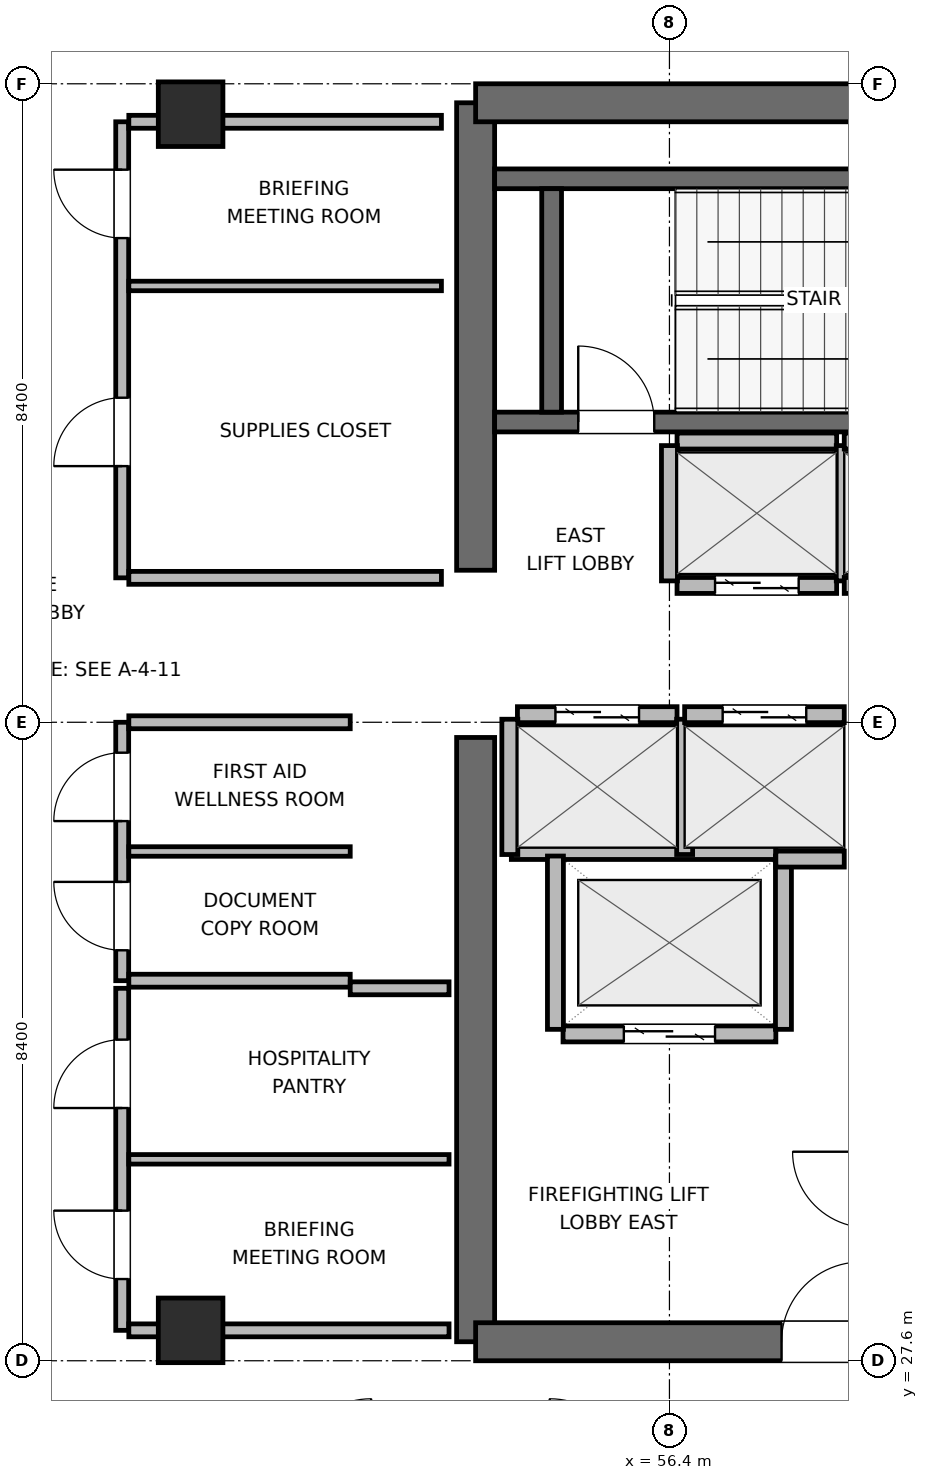
"""IFC4 building model, lengths in metres.
Left out: names, types, materials, properties, quantities, classifications, styles, units other than length and angle.
Written with IfcOpenShell. Run it as: python <this file> out.ifc"""

import sys

from ifc_helpers import new_model, si_unit, direction, frame, frame_2d, origin, origin_2d, place, context, subcontext, project, spatial, rectangle, extrude, element, fill, save


model = new_model("IFC4")
c1 = context("Model", 3, precision=1e-05, world=origin(), true_north=direction((0.0, 1.0)))
c2 = subcontext(c1, "Body", "Model", "MODEL_VIEW")
j1 = project(units=[si_unit("LENGTHUNIT", "METRE"), si_unit("PLANEANGLEUNIT", "RADIAN")], contexts=[c1])
p1 = place(None, origin())
s1 = spatial("IfcSite", under=j1, at=p1, CompositionType="ELEMENT")
p2 = place(p1, origin())
s2 = spatial("IfcBuilding", under=s1, at=p2, CompositionType="ELEMENT")
p3 = place(p2, frame((0.0, 0.0, 346.5)))
s3 = spatial("IfcBuildingStorey", under=s2, at=p3, CompositionType="ELEMENT", Elevation=346.5)
p4 = place(p3, frame((53.85, 27.85, 0.0), z_axis=(0.0, 0.0, 1.0), x_axis=(0.0, 1.0, 0.0)))
e1 = element("IfcWall", 1, at=p4, inside=s3, PredefinedType="SHEAR", context=c2, shape_type="SweptSolid", body=[
    extrude(rectangle(XDim=7.95, YDim=0.5, at=frame_2d((3.975, 0.0))), origin(), (0.0, 0.0, 1.0), 3.9),
])
p5 = place(p3, frame((53.85, 38.0, 0.0), z_axis=(0.0, 0.0, 1.0), x_axis=(0.0, 1.0, 0.0)))
e2 = element("IfcWall", 2, at=p5, inside=s3, PredefinedType="SHEAR", context=c2, shape_type="SweptSolid", body=[
    extrude(rectangle(XDim=6.15, YDim=0.5, at=frame_2d((3.075, 0.0))), origin(), (0.0, 0.0, 1.0), 3.9),
])
p6 = place(p3, frame((53.85, 27.85, 0.0), z_axis=(0.0, 0.0, 1.0), x_axis=(1.0, 0.0, 0.0)))
e3 = element("IfcWall", 3, at=p6, inside=s3, PredefinedType="SHEAR", context=c2, shape_type="SweptSolid", body=[
    extrude(rectangle(XDim=9.5, YDim=0.5, at=frame_2d((4.75, 0.0))), origin(), (0.0, 0.0, 1.0), 3.9),
])
p7 = place(p6, frame((4.025, 0.0, 0.0)))
e4 = element("IfcOpeningElement", 4, at=p7, cuts=e3, PredefinedType="OPENING", context=c2, shape_type="SweptSolid", body=[
    extrude(rectangle(XDim=1.05, YDim=2.04, at=frame_2d((0.525, 1.02))), frame((0.0, 0.26, 0.0), z_axis=(0.0, -1.0, 0.0), x_axis=(1.0, 0.0, 0.0)), (0.0, 0.0, 1.0), 0.52),
])
p8 = place(p3, frame((53.85, 44.15, 0.0), z_axis=(0.0, 0.0, 1.0), x_axis=(1.0, 0.0, 0.0)))
e5 = element("IfcWall", 5, at=p8, inside=s3, PredefinedType="SHEAR", context=c2, shape_type="SweptSolid", body=[
    extrude(rectangle(XDim=9.5, YDim=0.5, at=frame_2d((4.75, 0.0))), origin(), (0.0, 0.0, 1.0), 3.9),
])
p9 = place(p3, frame((54.1, 39.95, 0.0), z_axis=(0.0, 0.0, 1.0), x_axis=(1.0, 0.0, 0.0)))
e6 = element("IfcWall", 6, at=p9, inside=s3, PredefinedType="SHEAR", context=c2, shape_type="SweptSolid", body=[
    extrude(rectangle(XDim=9.0, YDim=0.26, at=frame_2d((4.5, 0.0))), origin(), (0.0, 0.0, 1.0), 3.9),
])
p10 = place(p9, frame((1.1, 0.0, 0.0)))
e7 = element("IfcOpeningElement", 7, at=p10, cuts=e6, PredefinedType="OPENING", context=c2, shape_type="SweptSolid", body=[
    extrude(rectangle(XDim=1.0, YDim=2.04, at=frame_2d((0.5, 1.02))), frame((0.0, 0.14, 0.0), z_axis=(0.0, -1.0, 0.0), x_axis=(1.0, 0.0, 0.0)), (0.0, 0.0, 1.0), 0.28),
])
p11 = place(p3, frame((54.1, 43.15, 0.0), z_axis=(0.0, 0.0, 1.0), x_axis=(1.0, 0.0, 0.0)))
e8 = element("IfcWall", 8, at=p11, inside=s3, PredefinedType="SHEAR", context=c2, shape_type="SweptSolid", body=[
    extrude(rectangle(XDim=9.0, YDim=0.26, at=frame_2d((4.5, 0.0))), origin(), (0.0, 0.0, 1.0), 3.9),
])
p12 = place(p3, frame((54.85, 40.08, 0.0), z_axis=(0.0, 0.0, 1.0), x_axis=(0.0, 1.0, 0.0)))
e9 = element("IfcWall", 9, at=p12, inside=s3, PredefinedType="SHEAR", context=c2, shape_type="SweptSolid", body=[
    extrude(rectangle(XDim=2.94, YDim=0.26, at=frame_2d((1.47, 0.0))), origin(), (0.0, 0.0, 1.0), 3.9),
])
for number, where, z_axis, x_axis in (
    (10, (50.1, 28.0, 0.0), (0.0, 0.0, 1.0), (1.0, 0.0, 0.0)),
    (11, (50.1, 44.0, 0.0), (0.0, 0.0, 1.0), (1.0, 0.0, 0.0)),
):
    element("IfcColumn", number, at=place(p3, frame(where, z_axis=z_axis, x_axis=x_axis)), inside=s3, PredefinedType="COLUMN", context=c2, shape_type="SweptSolid", body=[
        extrude(rectangle(XDim=0.85, YDim=0.85, at=origin_2d()), origin(), (0.0, 0.0, 1.0), 3.9),
    ])
p13 = place(p3, frame((55.0, 31.9, 0.0), z_axis=(0.0, 0.0, 1.0), x_axis=(1.0, 0.0, 0.0)))
e12 = element("IfcWall", 12, at=p13, inside=s3, PredefinedType="PARTITIONING", context=c2, shape_type="SweptSolid", body=[
    extrude(rectangle(XDim=2.8, YDim=0.21, at=frame_2d((1.4, 0.0))), origin(), (0.0, 0.0, 1.0), 3.68),
])
p14 = place(p13, frame((0.8, 0.0, 0.0)))
e13 = element("IfcOpeningElement", 13, at=p14, cuts=e12, PredefinedType="OPENING", context=c2, shape_type="SweptSolid", body=[
    extrude(rectangle(XDim=1.2, YDim=2.04, at=frame_2d((0.6, 1.02))), frame((0.0, 0.115, 0.0), z_axis=(0.0, -1.0, 0.0), x_axis=(1.0, 0.0, 0.0)), (0.0, 0.0, 1.0), 0.23),
])
p15 = place(p3, frame((54.32, 34.3, 0.0), z_axis=(0.0, 0.0, 1.0), x_axis=(1.0, 0.0, 0.0)))
e14 = element("IfcWall", 14, at=p15, inside=s3, PredefinedType="PARTITIONING", context=c2, shape_type="SweptSolid", body=[
    extrude(rectangle(XDim=3.48, YDim=0.21, at=frame_2d((1.74, 0.0))), origin(), (0.0, 0.0, 1.0), 3.68),
])
for number, where, z_axis, x_axis in (
    (15, (54.9, 31.96, 0.0), (0.0, 0.0, 1.0), (0.0, 1.0, 0.0)),
    (16, (57.9, 31.96, 0.0), (0.0, 0.0, 1.0), (0.0, 1.0, 0.0)),
):
    element("IfcWall", number, at=place(p3, frame(where, z_axis=z_axis, x_axis=x_axis)), inside=s3, PredefinedType="PARTITIONING", context=c2, shape_type="SweptSolid", body=[
        extrude(rectangle(XDim=2.28, YDim=0.21, at=frame_2d((1.14, 0.0))), origin(), (0.0, 0.0, 1.0), 3.68),
    ])
p16 = place(p3, frame((54.4, 36.1, 0.0), z_axis=(0.0, 0.0, 1.0), x_axis=(1.0, 0.0, 0.0)))
e17 = element("IfcWall", 17, at=p16, inside=s3, PredefinedType="PARTITIONING", context=c2, shape_type="SweptSolid", body=[
    extrude(rectangle(XDim=2.1, YDim=0.21, at=frame_2d((1.05, 0.0))), origin(), (0.0, 0.0, 1.0), 3.68),
])
p17 = place(p16, frame((0.5, 0.0, 0.0)))
e18 = element("IfcOpeningElement", 18, at=p17, cuts=e17, PredefinedType="OPENING", context=c2, shape_type="SweptSolid", body=[
    extrude(rectangle(XDim=1.1, YDim=2.04, at=frame_2d((0.55, 1.02))), frame((0.0, 0.115, 0.0), z_axis=(0.0, -1.0, 0.0), x_axis=(1.0, 0.0, 0.0)), (0.0, 0.0, 1.0), 0.23),
])
for number, where, z_axis, x_axis in (
    (19, (54.3, 34.26, 0.0), (0.0, 0.0, 1.0), (0.0, 1.0, 0.0)),
    (20, (56.6, 34.26, 0.0), (0.0, 0.0, 1.0), (0.0, 1.0, 0.0)),
):
    element("IfcWall", number, at=place(p3, frame(where, z_axis=z_axis, x_axis=x_axis)), inside=s3, PredefinedType="PARTITIONING", context=c2, shape_type="SweptSolid", body=[
        extrude(rectangle(XDim=1.78, YDim=0.21, at=frame_2d((0.89, 0.0))), origin(), (0.0, 0.0, 1.0), 3.68),
    ])
p18 = place(p3, frame((56.6, 36.1, 0.0), z_axis=(0.0, 0.0, 1.0), x_axis=(1.0, 0.0, 0.0)))
e21 = element("IfcWall", 21, at=p18, inside=s3, PredefinedType="PARTITIONING", context=c2, shape_type="SweptSolid", body=[
    extrude(rectangle(XDim=2.1, YDim=0.21, at=frame_2d((1.05, 0.0))), origin(), (0.0, 0.0, 1.0), 3.68),
])
p19 = place(p18, frame((0.5, 0.0, 0.0)))
e22 = element("IfcOpeningElement", 22, at=p19, cuts=e21, PredefinedType="OPENING", context=c2, shape_type="SweptSolid", body=[
    extrude(rectangle(XDim=1.1, YDim=2.04, at=frame_2d((0.55, 1.02))), frame((0.0, 0.115, 0.0), z_axis=(0.0, -1.0, 0.0), x_axis=(1.0, 0.0, 0.0)), (0.0, 0.0, 1.0), 0.23),
])
p20 = place(p3, frame((57.8, 34.2, 0.0), z_axis=(0.0, 0.0, 1.0), x_axis=(1.0, 0.0, 0.0)))
e23 = element("IfcWall", 23, at=p20, inside=s3, PredefinedType="PARTITIONING", context=c2, shape_type="SweptSolid", body=[
    extrude(rectangle(XDim=0.9, YDim=0.21, at=frame_2d((0.45, 0.0))), origin(), (0.0, 0.0, 1.0), 3.68),
])
p21 = place(p3, frame((56.5, 37.8, 0.0), z_axis=(0.0, 0.0, 1.0), x_axis=(1.0, 0.0, 0.0)))
e24 = element("IfcWall", 24, at=p21, inside=s3, PredefinedType="PARTITIONING", context=c2, shape_type="SweptSolid", body=[
    extrude(rectangle(XDim=2.1, YDim=0.21, at=frame_2d((1.05, 0.0))), origin(), (0.0, 0.0, 1.0), 3.68),
])
p22 = place(p21, frame((0.5, 0.0, 0.0)))
e25 = element("IfcOpeningElement", 25, at=p22, cuts=e24, PredefinedType="OPENING", context=c2, shape_type="SweptSolid", body=[
    extrude(rectangle(XDim=1.1, YDim=2.04, at=frame_2d((0.55, 1.02))), frame((0.0, 0.115, 0.0), z_axis=(0.0, -1.0, 0.0), x_axis=(1.0, 0.0, 0.0)), (0.0, 0.0, 1.0), 0.23),
])
p23 = place(p3, frame((56.5, 39.7, 0.0), z_axis=(0.0, 0.0, 1.0), x_axis=(1.0, 0.0, 0.0)))
e26 = element("IfcWall", 26, at=p23, inside=s3, PredefinedType="PARTITIONING", context=c2, shape_type="SweptSolid", body=[
    extrude(rectangle(XDim=2.1, YDim=0.21, at=frame_2d((1.05, 0.0))), origin(), (0.0, 0.0, 1.0), 3.68),
])
for number, where, z_axis, x_axis in (
    (27, (56.4, 37.86, 0.0), (0.0, 0.0, 1.0), (0.0, 1.0, 0.0)),
    (28, (58.7, 37.86, 0.0), (0.0, 0.0, 1.0), (0.0, 1.0, 0.0)),
):
    element("IfcWall", number, at=place(p3, frame(where, z_axis=z_axis, x_axis=x_axis)), inside=s3, PredefinedType="PARTITIONING", context=c2, shape_type="SweptSolid", body=[
        extrude(rectangle(XDim=1.78, YDim=0.21, at=frame_2d((0.89, 0.0))), origin(), (0.0, 0.0, 1.0), 3.68),
    ])
p24 = place(p3, frame((58.7, 37.8, 0.0), z_axis=(0.0, 0.0, 1.0), x_axis=(1.0, 0.0, 0.0)))
e29 = element("IfcWall", 29, at=p24, inside=s3, PredefinedType="PARTITIONING", context=c2, shape_type="SweptSolid", body=[
    extrude(rectangle(XDim=2.1, YDim=0.21, at=frame_2d((1.05, 0.0))), origin(), (0.0, 0.0, 1.0), 3.68),
])
p25 = place(p24, frame((0.5, 0.0, 0.0)))
e30 = element("IfcOpeningElement", 30, at=p25, cuts=e29, PredefinedType="OPENING", context=c2, shape_type="SweptSolid", body=[
    extrude(rectangle(XDim=1.1, YDim=2.04, at=frame_2d((0.55, 1.02))), frame((0.0, 0.115, 0.0), z_axis=(0.0, -1.0, 0.0), x_axis=(1.0, 0.0, 0.0)), (0.0, 0.0, 1.0), 0.23),
])
p26 = place(p3, frame((58.7, 39.7, 0.0), z_axis=(0.0, 0.0, 1.0), x_axis=(1.0, 0.0, 0.0)))
e31 = element("IfcWall", 31, at=p26, inside=s3, PredefinedType="PARTITIONING", context=c2, shape_type="SweptSolid", body=[
    extrude(rectangle(XDim=2.1, YDim=0.21, at=frame_2d((1.05, 0.0))), origin(), (0.0, 0.0, 1.0), 3.68),
])
p27 = place(p3, frame((49.2, 32.6, 0.0), z_axis=(0.0, 0.0, 1.0), x_axis=(0.0, 1.0, 0.0)))
e32 = element("IfcWall", 32, at=p27, inside=s3, PredefinedType="PARTITIONING", context=c2, shape_type="SweptSolid", body=[
    extrude(rectangle(XDim=3.4, YDim=0.17, at=frame_2d((1.7, 0.0))), origin(), (0.0, 0.0, 1.0), 3.68),
])
p28 = place(p27, frame((0.4, 0.0, 0.0)))
e33 = element("IfcOpeningElement", 33, at=p28, cuts=e32, PredefinedType="OPENING", context=c2, shape_type="SweptSolid", body=[
    extrude(rectangle(XDim=0.9, YDim=2.02, at=frame_2d((0.45, 1.01))), frame((0.0, 0.095, 0.0), z_axis=(0.0, -1.0, 0.0), x_axis=(1.0, 0.0, 0.0)), (0.0, 0.0, 1.0), 0.19),
])
p29 = place(p27, frame((2.1, 0.0, 0.0)))
e34 = element("IfcOpeningElement", 34, at=p29, cuts=e32, PredefinedType="OPENING", context=c2, shape_type="SweptSolid", body=[
    extrude(rectangle(XDim=0.9, YDim=2.02, at=frame_2d((0.45, 1.01))), frame((0.0, 0.095, 0.0), z_axis=(0.0, -1.0, 0.0), x_axis=(1.0, 0.0, 0.0)), (0.0, 0.0, 1.0), 0.19),
])
for number, where, z_axis, x_axis in (
    (35, (49.287, 32.6, 0.0), (0.0, 0.0, 1.0), (1.0, 0.0, 0.0)),
    (36, (49.287, 36.0, 0.0), (0.0, 0.0, 1.0), (1.0, 0.0, 0.0)),
):
    element("IfcWall", number, at=place(p3, frame(where, z_axis=z_axis, x_axis=x_axis)), inside=s3, PredefinedType="PARTITIONING", context=c2, shape_type="SweptSolid", body=[
        extrude(rectangle(XDim=2.913, YDim=0.17, at=frame_2d((1.457, 0.0))), origin(), (0.0, 0.0, 1.0), 3.68),
    ])
p30 = place(p3, frame((49.287, 34.3, 0.0), z_axis=(0.0, 0.0, 1.0), x_axis=(1.0, 0.0, 0.0)))
e37 = element("IfcWall", 37, at=p30, inside=s3, PredefinedType="PARTITIONING", context=c2, shape_type="SweptSolid", body=[
    extrude(rectangle(XDim=2.913, YDim=0.125, at=frame_2d((1.457, 0.0))), origin(), (0.0, 0.0, 1.0), 3.68),
])
p31 = place(p3, frame((49.2, 28.0, 0.0), z_axis=(0.0, 0.0, 1.0), x_axis=(0.0, 1.0, 0.0)))
e38 = element("IfcWall", 38, at=p31, inside=s3, PredefinedType="PARTITIONING", context=c2, shape_type="SweptSolid", body=[
    extrude(rectangle(XDim=4.5, YDim=0.17, at=frame_2d((2.25, 0.0))), origin(), (0.0, 0.0, 1.0), 3.68),
])
p32 = place(p31, frame((0.675, 0.0, 0.0)))
e39 = element("IfcOpeningElement", 39, at=p32, cuts=e38, PredefinedType="OPENING", context=c2, shape_type="SweptSolid", body=[
    extrude(rectangle(XDim=0.9, YDim=2.02, at=frame_2d((0.45, 1.01))), frame((0.0, 0.095, 0.0), z_axis=(0.0, -1.0, 0.0), x_axis=(1.0, 0.0, 0.0)), (0.0, 0.0, 1.0), 0.19),
])
p33 = place(p31, frame((2.925, 0.0, 0.0)))
e40 = element("IfcOpeningElement", 40, at=p33, cuts=e38, PredefinedType="OPENING", context=c2, shape_type="SweptSolid", body=[
    extrude(rectangle(XDim=0.9, YDim=2.02, at=frame_2d((0.45, 1.01))), frame((0.0, 0.095, 0.0), z_axis=(0.0, -1.0, 0.0), x_axis=(1.0, 0.0, 0.0)), (0.0, 0.0, 1.0), 0.19),
])
p34 = place(p3, frame((49.287, 28.0, 0.0), z_axis=(0.0, 0.0, 1.0), x_axis=(1.0, 0.0, 0.0)))
e41 = element("IfcWall", 41, at=p34, inside=s3, PredefinedType="PARTITIONING", context=c2, shape_type="SweptSolid", body=[
    extrude(rectangle(XDim=4.213, YDim=0.17, at=frame_2d((2.106, 0.0))), origin(), (0.0, 0.0, 1.0), 2.765),
])
p35 = place(p3, frame((52.2, 32.5, 0.0), z_axis=(0.0, 0.0, 1.0), x_axis=(1.0, 0.0, 0.0)))
e42 = element("IfcWall", 42, at=p35, inside=s3, PredefinedType="PARTITIONING", context=c2, shape_type="SweptSolid", body=[
    extrude(rectangle(XDim=1.3, YDim=0.17, at=frame_2d((0.65, 0.0))), origin(), (0.0, 0.0, 1.0), 3.68),
])
p36 = place(p3, frame((49.287, 30.25, 0.0), z_axis=(0.0, 0.0, 1.0), x_axis=(1.0, 0.0, 0.0)))
e43 = element("IfcWall", 43, at=p36, inside=s3, PredefinedType="PARTITIONING", context=c2, shape_type="SweptSolid", body=[
    extrude(rectangle(XDim=4.213, YDim=0.125, at=frame_2d((2.106, 0.0))), origin(), (0.0, 0.0, 1.0), 3.68),
])
p37 = place(p3, frame((49.2, 37.9, 0.0), z_axis=(0.0, 0.0, 1.0), x_axis=(0.0, 1.0, 0.0)))
e44 = element("IfcWall", 44, at=p37, inside=s3, PredefinedType="PARTITIONING", context=c2, shape_type="SweptSolid", body=[
    extrude(rectangle(XDim=6.0, YDim=0.17, at=frame_2d((3.0, 0.0))), origin(), (0.0, 0.0, 1.0), 3.68),
])
p38 = place(p37, frame((1.47, 0.0, 0.0)))
e45 = element("IfcOpeningElement", 45, at=p38, cuts=e44, PredefinedType="OPENING", context=c2, shape_type="SweptSolid", body=[
    extrude(rectangle(XDim=0.9, YDim=2.02, at=frame_2d((0.45, 1.01))), frame((0.0, 0.095, 0.0), z_axis=(0.0, -1.0, 0.0), x_axis=(1.0, 0.0, 0.0)), (0.0, 0.0, 1.0), 0.19),
])
p39 = place(p37, frame((4.47, 0.0, 0.0)))
e46 = element("IfcOpeningElement", 46, at=p39, cuts=e44, PredefinedType="OPENING", context=c2, shape_type="SweptSolid", body=[
    extrude(rectangle(XDim=0.9, YDim=2.02, at=frame_2d((0.45, 1.01))), frame((0.0, 0.095, 0.0), z_axis=(0.0, -1.0, 0.0), x_axis=(1.0, 0.0, 0.0)), (0.0, 0.0, 1.0), 0.19),
])
p40 = place(p3, frame((49.287, 37.9, 0.0), z_axis=(0.0, 0.0, 1.0), x_axis=(1.0, 0.0, 0.0)))
e47 = element("IfcWall", 47, at=p40, inside=s3, PredefinedType="PARTITIONING", context=c2, shape_type="SweptSolid", body=[
    extrude(rectangle(XDim=4.113, YDim=0.17, at=frame_2d((2.056, 0.0))), origin(), (0.0, 0.0, 1.0), 3.68),
])
p41 = place(p3, frame((49.287, 43.9, 0.0), z_axis=(0.0, 0.0, 1.0), x_axis=(1.0, 0.0, 0.0)))
e48 = element("IfcWall", 48, at=p41, inside=s3, PredefinedType="PARTITIONING", context=c2, shape_type="SweptSolid", body=[
    extrude(rectangle(XDim=4.113, YDim=0.17, at=frame_2d((2.056, 0.0))), origin(), (0.0, 0.0, 1.0), 2.765),
])
p42 = place(p3, frame((49.287, 41.74, 0.0), z_axis=(0.0, 0.0, 1.0), x_axis=(1.0, 0.0, 0.0)))
e49 = element("IfcWall", 49, at=p42, inside=s3, PredefinedType="PARTITIONING", context=c2, shape_type="SweptSolid", body=[
    extrude(rectangle(XDim=4.113, YDim=0.125, at=frame_2d((2.056, 0.0))), origin(), (0.0, 0.0, 1.0), 3.68),
])
p43 = place(p10, origin())
e50 = element("IfcDoor", 50, at=p43, inside=s3, OperationType="SINGLE_SWING_LEFT", PredefinedType="DOOR", context=c2, shape_type="SweptSolid", body=[
    extrude(rectangle(XDim=1.0, YDim=2.04, at=frame_2d((0.5, 1.02))), frame((0.0, 0.025, 0.0), z_axis=(0.0, -1.0, 0.0), x_axis=(1.0, 0.0, 0.0)), (0.0, 0.0, 1.0), 0.05),
])
fill(e7, e50)
p44 = place(p14, origin())
e51 = element("IfcDoor", 51, at=p44, inside=s3, OperationType="DOUBLE_DOOR_SLIDING", PredefinedType="DOOR", context=c2, shape_type="SweptSolid", body=[
    extrude(rectangle(XDim=1.2, YDim=2.04, at=frame_2d((0.6, 1.02))), frame((0.0, 0.025, 0.0), z_axis=(0.0, -1.0, 0.0), x_axis=(1.0, 0.0, 0.0)), (0.0, 0.0, 1.0), 0.05),
])
fill(e13, e51)
p45 = place(p17, origin())
e52 = element("IfcDoor", 52, at=p45, inside=s3, OperationType="DOUBLE_DOOR_SLIDING", PredefinedType="DOOR", context=c2, shape_type="SweptSolid", body=[
    extrude(rectangle(XDim=1.1, YDim=2.04, at=frame_2d((0.55, 1.02))), frame((0.0, 0.025, 0.0), z_axis=(0.0, -1.0, 0.0), x_axis=(1.0, 0.0, 0.0)), (0.0, 0.0, 1.0), 0.05),
])
fill(e18, e52)
p46 = place(p19, origin())
e53 = element("IfcDoor", 53, at=p46, inside=s3, OperationType="DOUBLE_DOOR_SLIDING", PredefinedType="DOOR", context=c2, shape_type="SweptSolid", body=[
    extrude(rectangle(XDim=1.1, YDim=2.04, at=frame_2d((0.55, 1.02))), frame((0.0, 0.025, 0.0), z_axis=(0.0, -1.0, 0.0), x_axis=(1.0, 0.0, 0.0)), (0.0, 0.0, 1.0), 0.05),
])
fill(e22, e53)
p47 = place(p22, origin())
e54 = element("IfcDoor", 54, at=p47, inside=s3, OperationType="DOUBLE_DOOR_SLIDING", PredefinedType="DOOR", context=c2, shape_type="SweptSolid", body=[
    extrude(rectangle(XDim=1.1, YDim=2.04, at=frame_2d((0.55, 1.02))), frame((0.0, 0.025, 0.0), z_axis=(0.0, -1.0, 0.0), x_axis=(1.0, 0.0, 0.0)), (0.0, 0.0, 1.0), 0.05),
])
fill(e25, e54)
p48 = place(p7, origin())
e55 = element("IfcDoor", 55, at=p48, inside=s3, OperationType="SINGLE_SWING_RIGHT", PredefinedType="DOOR", context=c2, shape_type="SweptSolid", body=[
    extrude(rectangle(XDim=1.05, YDim=2.04, at=frame_2d((0.525, 1.02))), frame((0.0, 0.025, 0.0), z_axis=(0.0, -1.0, 0.0), x_axis=(1.0, 0.0, 0.0)), (0.0, 0.0, 1.0), 0.05),
])
fill(e4, e55)
p49 = place(p28, origin())
e56 = element("IfcDoor", 56, at=p49, inside=s3, OperationType="SINGLE_SWING_RIGHT", PredefinedType="DOOR", context=c2, shape_type="SweptSolid", body=[
    extrude(rectangle(XDim=0.9, YDim=2.02, at=frame_2d((0.45, 1.01))), frame((0.0, 0.025, 0.0), z_axis=(0.0, -1.0, 0.0), x_axis=(1.0, 0.0, 0.0)), (0.0, 0.0, 1.0), 0.05),
])
fill(e33, e56)
p50 = place(p29, origin())
e57 = element("IfcDoor", 57, at=p50, inside=s3, OperationType="SINGLE_SWING_LEFT", PredefinedType="DOOR", context=c2, shape_type="SweptSolid", body=[
    extrude(rectangle(XDim=0.9, YDim=2.02, at=frame_2d((0.45, 1.01))), frame((0.0, 0.025, 0.0), z_axis=(0.0, -1.0, 0.0), x_axis=(1.0, 0.0, 0.0)), (0.0, 0.0, 1.0), 0.05),
])
fill(e34, e57)
p51 = place(p32, origin())
e58 = element("IfcDoor", 58, at=p51, inside=s3, OperationType="SINGLE_SWING_RIGHT", PredefinedType="DOOR", context=c2, shape_type="SweptSolid", body=[
    extrude(rectangle(XDim=0.9, YDim=2.02, at=frame_2d((0.45, 1.01))), frame((0.0, 0.025, 0.0), z_axis=(0.0, -1.0, 0.0), x_axis=(1.0, 0.0, 0.0)), (0.0, 0.0, 1.0), 0.05),
])
fill(e39, e58)
p52 = place(p33, origin())
e59 = element("IfcDoor", 59, at=p52, inside=s3, OperationType="SINGLE_SWING_LEFT", PredefinedType="DOOR", context=c2, shape_type="SweptSolid", body=[
    extrude(rectangle(XDim=0.9, YDim=2.02, at=frame_2d((0.45, 1.01))), frame((0.0, 0.025, 0.0), z_axis=(0.0, -1.0, 0.0), x_axis=(1.0, 0.0, 0.0)), (0.0, 0.0, 1.0), 0.05),
])
fill(e40, e59)
p53 = place(p38, origin())
e60 = element("IfcDoor", 60, at=p53, inside=s3, OperationType="SINGLE_SWING_LEFT", PredefinedType="DOOR", context=c2, shape_type="SweptSolid", body=[
    extrude(rectangle(XDim=0.9, YDim=2.02, at=frame_2d((0.45, 1.01))), frame((0.0, 0.025, 0.0), z_axis=(0.0, -1.0, 0.0), x_axis=(1.0, 0.0, 0.0)), (0.0, 0.0, 1.0), 0.05),
])
fill(e45, e60)
p54 = place(p39, origin())
e61 = element("IfcDoor", 61, at=p54, inside=s3, OperationType="SINGLE_SWING_RIGHT", PredefinedType="DOOR", context=c2, shape_type="SweptSolid", body=[
    extrude(rectangle(XDim=0.9, YDim=2.02, at=frame_2d((0.45, 1.01))), frame((0.0, 0.025, 0.0), z_axis=(0.0, -1.0, 0.0), x_axis=(1.0, 0.0, 0.0)), (0.0, 0.0, 1.0), 0.05),
])
fill(e46, e61)
save(model, sys.argv[1])
